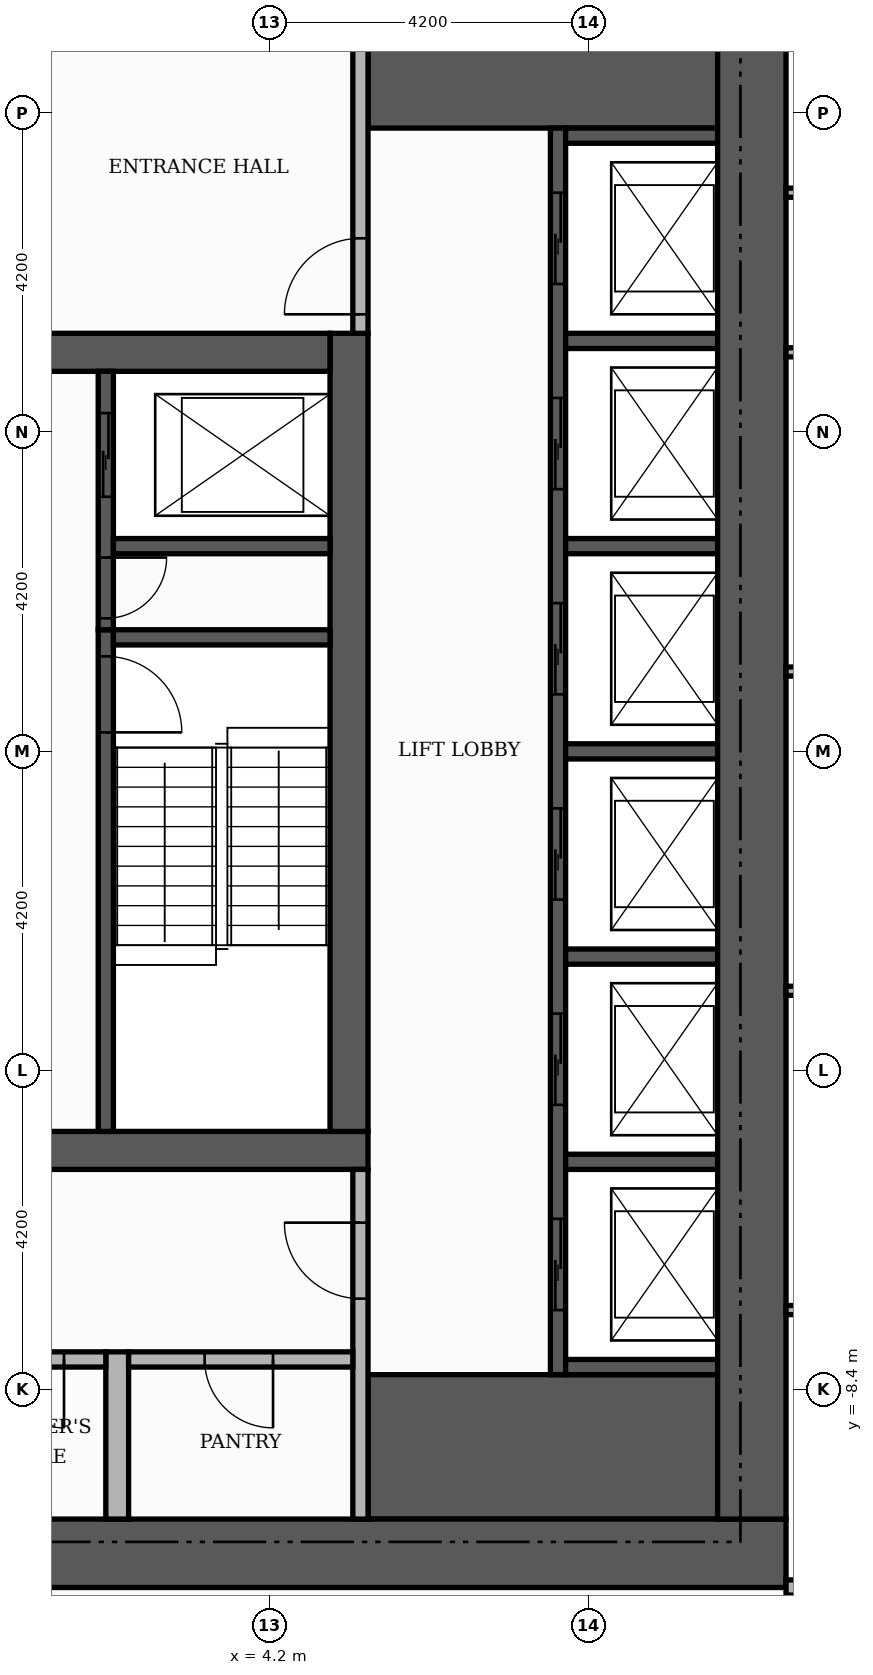
"""IFC4 building model, lengths in metres.
Left out: names, types, materials, properties, quantities, classifications, styles, units other than length and angle.
Written with IfcOpenShell. Run it as: python <this file> out.ifc"""

import sys

from ifc_helpers import new_model, si_unit, direction, frame, frame_2d, origin, place, context, subcontext, project, spatial, rectangle, extrude, element, fill, save


model = new_model("IFC4")
c1 = context("Model", 3, precision=1e-05, world=origin(), true_north=direction((0.0, 1.0)))
c2 = subcontext(c1, "Body", "Model", "MODEL_VIEW")
j1 = project(units=[si_unit("LENGTHUNIT", "METRE"), si_unit("PLANEANGLEUNIT", "RADIAN")], contexts=[c1])
p1 = place(None, origin())
s1 = spatial("IfcSite", under=j1, at=p1, CompositionType="ELEMENT")
p2 = place(p1, origin())
s2 = spatial("IfcBuilding", under=s1, at=p2, CompositionType="ELEMENT")
p3 = place(p2, frame((0.0, 0.0, 244.5)))
s3 = spatial("IfcBuildingStorey", under=s2, at=p3, CompositionType="ELEMENT", Elevation=244.5)
p4 = place(p3, frame((-5.5, -5.25, 0.0), z_axis=(0.0, 0.0, 1.0), x_axis=(1.0, 0.0, 0.0)))
e1 = element("IfcWall", 1, at=p4, inside=s3, PredefinedType="SHEAR", context=c2, shape_type="SweptSolid", body=[
    extrude(rectangle(XDim=11.0, YDim=0.5, at=frame_2d((5.5, 0.0))), origin(), (0.0, 0.0, 1.0), 3.48),
])
p5 = place(p4, frame((4.9, 0.0, 0.0)))
e2 = element("IfcOpeningElement", 2, at=p5, cuts=e1, PredefinedType="OPENING", context=c2, shape_type="SweptSolid", body=[
    extrude(rectangle(XDim=1.2, YDim=2.1, at=frame_2d((0.6, 1.05))), frame((0.0, 0.26, 0.0), z_axis=(0.0, -1.0, 0.0), x_axis=(1.0, 0.0, 0.0)), (0.0, 0.0, 1.0), 0.52),
])
p6 = place(p3, frame((5.25, -5.0, 0.0), z_axis=(0.0, 0.0, 1.0), x_axis=(0.0, 1.0, 0.0)))
e3 = element("IfcWall", 3, at=p6, inside=s3, PredefinedType="SHEAR", context=c2, shape_type="SweptSolid", body=[
    extrude(rectangle(XDim=10.5, YDim=0.5, at=frame_2d((5.25, 0.0))), origin(), (0.0, 0.0, 1.0), 3.48),
])
p7 = place(p3, frame((-5.0, 5.25, 0.0), z_axis=(0.0, 0.0, 1.0), x_axis=(1.0, 0.0, 0.0)))
e4 = element("IfcWall", 4, at=p7, inside=s3, PredefinedType="SHEAR", context=c2, shape_type="SweptSolid", body=[
    extrude(rectangle(XDim=10.0, YDim=0.5, at=frame_2d((5.0, 0.0))), origin(), (0.0, 0.0, 1.0), 3.48),
])
p8 = place(p7, frame((4.4, 0.0, 0.0)))
e5 = element("IfcOpeningElement", 5, at=p8, cuts=e4, PredefinedType="OPENING", context=c2, shape_type="SweptSolid", body=[
    extrude(rectangle(XDim=1.2, YDim=2.1, at=frame_2d((0.6, 1.05))), frame((0.0, 0.26, 0.0), z_axis=(0.0, -1.0, 0.0), x_axis=(1.0, 0.0, 0.0)), (0.0, 0.0, 1.0), 0.52),
])
for number, where, z_axis, x_axis in (
    (6, (5.5, -9.15, 0.0), (0.0, 0.0, 1.0), (1.0, 0.0, 0.0)),
    (7, (5.5, 9.15, 0.0), (0.0, 0.0, 1.0), (1.0, 0.0, 0.0)),
):
    element("IfcWall", number, at=place(p3, frame(where, z_axis=z_axis, x_axis=x_axis)), inside=s3, PredefinedType="SHEAR", context=c2, shape_type="SweptSolid", body=[
        extrude(rectangle(XDim=4.6, YDim=1.9, at=frame_2d((2.3, 0.0))), origin(), (0.0, 0.0, 1.0), 3.48),
    ])
p9 = place(p3, frame((2.05, -5.0, 0.0), z_axis=(0.0, 0.0, 1.0), x_axis=(0.0, 1.0, 0.0)))
e8 = element("IfcWall", 8, at=p9, inside=s3, PredefinedType="SHEAR", context=c2, shape_type="SweptSolid", body=[
    extrude(rectangle(XDim=6.6, YDim=0.2, at=frame_2d((3.3, 0.0))), origin(), (0.0, 0.0, 1.0), 3.48),
])
p10 = place(p9, frame((5.25, 0.0, 0.0)))
e9 = element("IfcOpeningElement", 9, at=p10, cuts=e8, PredefinedType="OPENING", context=c2, shape_type="SweptSolid", body=[
    extrude(rectangle(XDim=1.0, YDim=2.1, at=frame_2d((0.5, 1.05))), frame((0.0, 0.11, 0.0), z_axis=(0.0, -1.0, 0.0), x_axis=(1.0, 0.0, 0.0)), (0.0, 0.0, 1.0), 0.22),
])
p11 = place(p3, frame((2.15, 1.5, 0.0), z_axis=(0.0, 0.0, 1.0), x_axis=(1.0, 0.0, 0.0)))
e10 = element("IfcWall", 10, at=p11, inside=s3, PredefinedType="SHEAR", context=c2, shape_type="SweptSolid", body=[
    extrude(rectangle(XDim=2.85, YDim=0.2, at=frame_2d((1.425, 0.0))), origin(), (0.0, 0.0, 1.0), 3.48),
])
p12 = place(p3, frame((8.0, -8.2, 0.0), z_axis=(0.0, 0.0, 1.0), x_axis=(0.0, 1.0, 0.0)))
e11 = element("IfcWall", 11, at=p12, inside=s3, PredefinedType="SHEAR", context=c2, shape_type="SweptSolid", body=[
    extrude(rectangle(XDim=16.4, YDim=0.2, at=frame_2d((8.2, 0.0))), origin(), (0.0, 0.0, 1.0), 3.48),
])
p13 = place(p12, frame((0.85, 0.0, 0.0)))
e12 = element("IfcOpeningElement", 12, at=p13, cuts=e11, PredefinedType="OPENING", context=c2, shape_type="SweptSolid", body=[
    extrude(rectangle(XDim=1.2, YDim=2.1, at=frame_2d((0.6, 1.05))), frame((0.0, 0.11, 0.0), z_axis=(0.0, -1.0, 0.0), x_axis=(1.0, 0.0, 0.0)), (0.0, 0.0, 1.0), 0.22),
])
p14 = place(p12, frame((3.55, 0.0, 0.0)))
e13 = element("IfcOpeningElement", 13, at=p14, cuts=e11, PredefinedType="OPENING", context=c2, shape_type="SweptSolid", body=[
    extrude(rectangle(XDim=1.2, YDim=2.1, at=frame_2d((0.6, 1.05))), frame((0.0, 0.11, 0.0), z_axis=(0.0, -1.0, 0.0), x_axis=(1.0, 0.0, 0.0)), (0.0, 0.0, 1.0), 0.22),
])
p15 = place(p12, frame((6.25, 0.0, 0.0)))
e14 = element("IfcOpeningElement", 14, at=p15, cuts=e11, PredefinedType="OPENING", context=c2, shape_type="SweptSolid", body=[
    extrude(rectangle(XDim=1.2, YDim=2.1, at=frame_2d((0.6, 1.05))), frame((0.0, 0.11, 0.0), z_axis=(0.0, -1.0, 0.0), x_axis=(1.0, 0.0, 0.0)), (0.0, 0.0, 1.0), 0.22),
])
p16 = place(p12, frame((8.95, 0.0, 0.0)))
e15 = element("IfcOpeningElement", 15, at=p16, cuts=e11, PredefinedType="OPENING", context=c2, shape_type="SweptSolid", body=[
    extrude(rectangle(XDim=1.2, YDim=2.1, at=frame_2d((0.6, 1.05))), frame((0.0, 0.11, 0.0), z_axis=(0.0, -1.0, 0.0), x_axis=(1.0, 0.0, 0.0)), (0.0, 0.0, 1.0), 0.22),
])
p17 = place(p12, frame((11.65, 0.0, 0.0)))
e16 = element("IfcOpeningElement", 16, at=p17, cuts=e11, PredefinedType="OPENING", context=c2, shape_type="SweptSolid", body=[
    extrude(rectangle(XDim=1.2, YDim=2.1, at=frame_2d((0.6, 1.05))), frame((0.0, 0.11, 0.0), z_axis=(0.0, -1.0, 0.0), x_axis=(1.0, 0.0, 0.0)), (0.0, 0.0, 1.0), 0.22),
])
p18 = place(p12, frame((14.35, 0.0, 0.0)))
e17 = element("IfcOpeningElement", 17, at=p18, cuts=e11, PredefinedType="OPENING", context=c2, shape_type="SweptSolid", body=[
    extrude(rectangle(XDim=1.2, YDim=2.1, at=frame_2d((0.6, 1.05))), frame((0.0, 0.11, 0.0), z_axis=(0.0, -1.0, 0.0), x_axis=(1.0, 0.0, 0.0)), (0.0, 0.0, 1.0), 0.22),
])
for number, where, z_axis, x_axis in (
    (18, (8.1, -8.1, 0.0), (0.0, 0.0, 1.0), (1.0, 0.0, 0.0)),
    (19, (8.1, -5.4, 0.0), (0.0, 0.0, 1.0), (1.0, 0.0, 0.0)),
    (20, (8.1, -2.7, 0.0), (0.0, 0.0, 1.0), (1.0, 0.0, 0.0)),
    (21, (8.1, 0.0, 0.0), (0.0, 0.0, 1.0), (1.0, 0.0, 0.0)),
):
    element("IfcWall", number, at=place(p3, frame(where, z_axis=z_axis, x_axis=x_axis)), inside=s3, PredefinedType="SHEAR", context=c2, shape_type="SweptSolid", body=[
        extrude(rectangle(XDim=2.0, YDim=0.2, at=frame_2d((1.0, 0.0))), origin(), (0.0, 0.0, 1.0), 3.48),
    ])
p19 = place(p3, frame((2.05, 1.6, 0.0), z_axis=(0.0, 0.0, 1.0), x_axis=(0.0, 1.0, 0.0)))
e22 = element("IfcWall", 22, at=p19, inside=s3, PredefinedType="SHEAR", context=c2, shape_type="SweptSolid", body=[
    extrude(rectangle(XDim=3.4, YDim=0.2, at=frame_2d((1.7, 0.0))), origin(), (0.0, 0.0, 1.0), 3.48),
])
p20 = place(p19, frame((1.75, 0.0, 0.0)))
e23 = element("IfcOpeningElement", 23, at=p20, cuts=e22, PredefinedType="OPENING", context=c2, shape_type="SweptSolid", body=[
    extrude(rectangle(XDim=1.1, YDim=2.1, at=frame_2d((0.55, 1.05))), frame((0.0, 0.11, 0.0), z_axis=(0.0, -1.0, 0.0), x_axis=(1.0, 0.0, 0.0)), (0.0, 0.0, 1.0), 0.22),
])
p21 = place(p19, frame((0.15, 0.0, 0.0)))
e24 = element("IfcOpeningElement", 24, at=p21, cuts=e22, PredefinedType="OPENING", context=c2, shape_type="SweptSolid", body=[
    extrude(rectangle(XDim=0.8, YDim=2.1, at=frame_2d((0.4, 1.05))), frame((0.0, 0.11, 0.0), z_axis=(0.0, -1.0, 0.0), x_axis=(1.0, 0.0, 0.0)), (0.0, 0.0, 1.0), 0.22),
])
p22 = place(p3, frame((2.15, 2.7, 0.0), z_axis=(0.0, 0.0, 1.0), x_axis=(1.0, 0.0, 0.0)))
e25 = element("IfcWall", 25, at=p22, inside=s3, PredefinedType="SHEAR", context=c2, shape_type="SweptSolid", body=[
    extrude(rectangle(XDim=2.85, YDim=0.2, at=frame_2d((1.425, 0.0))), origin(), (0.0, 0.0, 1.0), 3.48),
])
for number, where, z_axis, x_axis in (
    (26, (8.1, 2.7, 0.0), (0.0, 0.0, 1.0), (1.0, 0.0, 0.0)),
    (27, (8.1, 5.4, 0.0), (0.0, 0.0, 1.0), (1.0, 0.0, 0.0)),
    (28, (8.1, 8.1, 0.0), (0.0, 0.0, 1.0), (1.0, 0.0, 0.0)),
):
    element("IfcWall", number, at=place(p3, frame(where, z_axis=z_axis, x_axis=x_axis)), inside=s3, PredefinedType="SHEAR", context=c2, shape_type="SweptSolid", body=[
        extrude(rectangle(XDim=2.0, YDim=0.2, at=frame_2d((1.0, 0.0))), origin(), (0.0, 0.0, 1.0), 3.48),
    ])
p23 = place(p3, frame((-11.0, -10.55, 0.0), z_axis=(0.0, 0.0, 1.0), x_axis=(1.0, 0.0, 0.0)))
e29 = element("IfcWall", 29, at=p23, inside=s3, PredefinedType="SHEAR", context=c2, shape_type="SweptSolid", body=[
    extrude(rectangle(XDim=22.0, YDim=0.9, at=frame_2d((11.0, 0.0))), origin(), (0.0, 0.0, 1.0), 3.48),
])
p24 = place(p23, frame((7.4, 0.0, 0.0)))
e30 = element("IfcOpeningElement", 30, at=p24, cuts=e29, PredefinedType="OPENING", context=c2, shape_type="SweptSolid", body=[
    extrude(rectangle(XDim=1.8, YDim=2.2, at=frame_2d((0.9, 1.1))), frame((0.0, 0.46, 0.0), z_axis=(0.0, -1.0, 0.0), x_axis=(1.0, 0.0, 0.0)), (0.0, 0.0, 1.0), 0.92),
])
p25 = place(p3, frame((10.55, -10.1, 0.0), z_axis=(0.0, 0.0, 1.0), x_axis=(0.0, 1.0, 0.0)))
e31 = element("IfcWall", 31, at=p25, inside=s3, PredefinedType="SHEAR", context=c2, shape_type="SweptSolid", body=[
    extrude(rectangle(XDim=20.2, YDim=0.9, at=frame_2d((10.1, 0.0))), origin(), (0.0, 0.0, 1.0), 3.48),
])
p26 = place(p3, frame((2.2, -10.1, 0.0), z_axis=(0.0, 0.0, 1.0), x_axis=(0.0, 1.0, 0.0)))
e32 = element("IfcWall", 32, at=p26, inside=s3, PredefinedType="PARTITIONING", context=c2, shape_type="SweptSolid", body=[
    extrude(rectangle(XDim=2.2, YDim=0.3, at=frame_2d((1.1, 0.0))), origin(), (0.0, 0.0, 1.0), 3.48),
])
p27 = place(p3, frame((5.4, -10.1, 0.0), z_axis=(0.0, 0.0, 1.0), x_axis=(0.0, 1.0, 0.0)))
e33 = element("IfcWall", 33, at=p27, inside=s3, PredefinedType="PARTITIONING", context=c2, shape_type="SweptSolid", body=[
    extrude(rectangle(XDim=4.6, YDim=0.2, at=frame_2d((2.3, 0.0))), origin(), (0.0, 0.0, 1.0), 3.48),
])
p28 = place(p27, frame((2.9, 0.0, 0.0)))
e34 = element("IfcOpeningElement", 34, at=p28, cuts=e33, PredefinedType="OPENING", context=c2, shape_type="SweptSolid", body=[
    extrude(rectangle(XDim=1.0, YDim=2.1, at=frame_2d((0.5, 1.05))), frame((0.0, 0.11, 0.0), z_axis=(0.0, -1.0, 0.0), x_axis=(1.0, 0.0, 0.0)), (0.0, 0.0, 1.0), 0.22),
])
p29 = place(p3, frame((0.1, -8.0, 0.0), z_axis=(0.0, 0.0, 1.0), x_axis=(1.0, 0.0, 0.0)))
e35 = element("IfcWall", 35, at=p29, inside=s3, PredefinedType="PARTITIONING", context=c2, shape_type="SweptSolid", body=[
    extrude(rectangle(XDim=1.95, YDim=0.2, at=frame_2d((0.975, 0.0))), origin(), (0.0, 0.0, 1.0), 3.48),
])
p30 = place(p29, frame((0.5, 0.0, 0.0)))
e36 = element("IfcOpeningElement", 36, at=p30, cuts=e35, PredefinedType="OPENING", context=c2, shape_type="SweptSolid", body=[
    extrude(rectangle(XDim=0.9, YDim=2.1, at=frame_2d((0.45, 1.05))), frame((0.0, 0.11, 0.0), z_axis=(0.0, -1.0, 0.0), x_axis=(1.0, 0.0, 0.0)), (0.0, 0.0, 1.0), 0.22),
])
p31 = place(p3, frame((2.35, -8.0, 0.0), z_axis=(0.0, 0.0, 1.0), x_axis=(1.0, 0.0, 0.0)))
e37 = element("IfcWall", 37, at=p31, inside=s3, PredefinedType="PARTITIONING", context=c2, shape_type="SweptSolid", body=[
    extrude(rectangle(XDim=2.95, YDim=0.2, at=frame_2d((1.475, 0.0))), origin(), (0.0, 0.0, 1.0), 3.48),
])
p32 = place(p31, frame((1.0, 0.0, 0.0)))
e38 = element("IfcOpeningElement", 38, at=p32, cuts=e37, PredefinedType="OPENING", context=c2, shape_type="SweptSolid", body=[
    extrude(rectangle(XDim=0.9, YDim=2.1, at=frame_2d((0.45, 1.05))), frame((0.0, 0.11, 0.0), z_axis=(0.0, -1.0, 0.0), x_axis=(1.0, 0.0, 0.0)), (0.0, 0.0, 1.0), 0.22),
])
p33 = place(p3, frame((5.4, 5.5, 0.0), z_axis=(0.0, 0.0, 1.0), x_axis=(0.0, 1.0, 0.0)))
e39 = element("IfcWall", 39, at=p33, inside=s3, PredefinedType="PARTITIONING", context=c2, shape_type="SweptSolid", body=[
    extrude(rectangle(XDim=4.6, YDim=0.2, at=frame_2d((2.3, 0.0))), origin(), (0.0, 0.0, 1.0), 3.48),
])
p34 = place(p33, frame((0.25, 0.0, 0.0)))
e40 = element("IfcOpeningElement", 40, at=p34, cuts=e39, PredefinedType="OPENING", context=c2, shape_type="SweptSolid", body=[
    extrude(rectangle(XDim=1.0, YDim=2.1, at=frame_2d((0.5, 1.05))), frame((0.0, 0.11, 0.0), z_axis=(0.0, -1.0, 0.0), x_axis=(1.0, 0.0, 0.0)), (0.0, 0.0, 1.0), 0.22),
])
p35 = place(p3, frame((11.0, -11.0, 0.0), z_axis=(0.0, 0.0, 1.0), x_axis=(1.0, 0.0, 0.0)))
e41 = element("IfcWall", 41, at=p35, inside=s3, PredefinedType="PARTITIONING", context=c2, shape_type="SweptSolid", body=[
    extrude(rectangle(XDim=2.65, YDim=0.2, at=frame_2d((1.325, 0.0))), origin(), (0.0, 0.0, 1.0), 3.48),
])
p36 = place(p35, frame((0.775, 0.0, 0.0)))
e42 = element("IfcOpeningElement", 42, at=p36, cuts=e41, PredefinedType="OPENING", context=c2, shape_type="SweptSolid", body=[
    extrude(rectangle(XDim=1.1, YDim=2.4, at=frame_2d((0.55, 1.2))), frame((0.0, 0.11, 0.0), z_axis=(0.0, -1.0, 0.0), x_axis=(1.0, 0.0, 0.0)), (0.0, 0.0, 1.0), 0.22),
])
p37 = place(p3, frame((11.0, -7.35, 0.0), z_axis=(0.0, 0.0, 1.0), x_axis=(1.0, 0.0, 0.0)))
e43 = element("IfcWall", 43, at=p37, inside=s3, PredefinedType="PARTITIONING", context=c2, shape_type="SweptSolid", body=[
    extrude(rectangle(XDim=8.22, YDim=0.12, at=frame_2d((4.11, 0.0))), origin(), (0.0, 0.0, 1.0), 3.48),
])
p38 = place(p37, frame((3.66, 0.0, 0.0)))
e44 = element("IfcOpeningElement", 44, at=p38, cuts=e43, PredefinedType="OPENING", context=c2, shape_type="SweptSolid", body=[
    extrude(rectangle(XDim=0.9, YDim=2.1, at=frame_2d((0.45, 1.05))), frame((0.0, 0.07, 0.0), z_axis=(0.0, -1.0, 0.0), x_axis=(1.0, 0.0, 0.0)), (0.0, 0.0, 1.0), 0.14),
])
for number, where, z_axis, x_axis in (
    (45, (11.0, -3.15, 0.0), (0.0, 0.0, 1.0), (1.0, 0.0, 0.0)),
    (46, (11.0, 1.05, 0.0), (0.0, 0.0, 1.0), (1.0, 0.0, 0.0)),
    (47, (11.0, 5.25, 0.0), (0.0, 0.0, 1.0), (1.0, 0.0, 0.0)),
    (48, (11.0, 7.35, 0.0), (0.0, 0.0, 1.0), (1.0, 0.0, 0.0)),
):
    element("IfcWall", number, at=place(p3, frame(where, z_axis=z_axis, x_axis=x_axis)), inside=s3, PredefinedType="PARTITIONING", context=c2, shape_type="SweptSolid", body=[
        extrude(rectangle(XDim=8.22, YDim=0.12, at=frame_2d((4.11, 0.0))), origin(), (0.0, 0.0, 1.0), 3.48),
    ])
p39 = place(p13, origin())
e49 = element("IfcDoor", 49, at=p39, inside=s3, OperationType="SLIDING_TO_LEFT", PredefinedType="DOOR", context=c2, shape_type="SweptSolid", body=[
    extrude(rectangle(XDim=1.2, YDim=2.1, at=frame_2d((0.6, 1.05))), frame((0.0, 0.025, 0.0), z_axis=(0.0, -1.0, 0.0), x_axis=(1.0, 0.0, 0.0)), (0.0, 0.0, 1.0), 0.05),
])
fill(e12, e49)
p40 = place(p14, origin())
e50 = element("IfcDoor", 50, at=p40, inside=s3, OperationType="SLIDING_TO_LEFT", PredefinedType="DOOR", context=c2, shape_type="SweptSolid", body=[
    extrude(rectangle(XDim=1.2, YDim=2.1, at=frame_2d((0.6, 1.05))), frame((0.0, 0.025, 0.0), z_axis=(0.0, -1.0, 0.0), x_axis=(1.0, 0.0, 0.0)), (0.0, 0.0, 1.0), 0.05),
])
fill(e13, e50)
p41 = place(p15, origin())
e51 = element("IfcDoor", 51, at=p41, inside=s3, OperationType="SLIDING_TO_LEFT", PredefinedType="DOOR", context=c2, shape_type="SweptSolid", body=[
    extrude(rectangle(XDim=1.2, YDim=2.1, at=frame_2d((0.6, 1.05))), frame((0.0, 0.025, 0.0), z_axis=(0.0, -1.0, 0.0), x_axis=(1.0, 0.0, 0.0)), (0.0, 0.0, 1.0), 0.05),
])
fill(e14, e51)
p42 = place(p16, origin())
e52 = element("IfcDoor", 52, at=p42, inside=s3, OperationType="SLIDING_TO_LEFT", PredefinedType="DOOR", context=c2, shape_type="SweptSolid", body=[
    extrude(rectangle(XDim=1.2, YDim=2.1, at=frame_2d((0.6, 1.05))), frame((0.0, 0.025, 0.0), z_axis=(0.0, -1.0, 0.0), x_axis=(1.0, 0.0, 0.0)), (0.0, 0.0, 1.0), 0.05),
])
fill(e15, e52)
p43 = place(p17, origin())
e53 = element("IfcDoor", 53, at=p43, inside=s3, OperationType="SLIDING_TO_LEFT", PredefinedType="DOOR", context=c2, shape_type="SweptSolid", body=[
    extrude(rectangle(XDim=1.2, YDim=2.1, at=frame_2d((0.6, 1.05))), frame((0.0, 0.025, 0.0), z_axis=(0.0, -1.0, 0.0), x_axis=(1.0, 0.0, 0.0)), (0.0, 0.0, 1.0), 0.05),
])
fill(e16, e53)
p44 = place(p18, origin())
e54 = element("IfcDoor", 54, at=p44, inside=s3, OperationType="SLIDING_TO_LEFT", PredefinedType="DOOR", context=c2, shape_type="SweptSolid", body=[
    extrude(rectangle(XDim=1.2, YDim=2.1, at=frame_2d((0.6, 1.05))), frame((0.0, 0.025, 0.0), z_axis=(0.0, -1.0, 0.0), x_axis=(1.0, 0.0, 0.0)), (0.0, 0.0, 1.0), 0.05),
])
fill(e17, e54)
p45 = place(p20, origin())
e55 = element("IfcDoor", 55, at=p45, inside=s3, OperationType="SLIDING_TO_LEFT", PredefinedType="DOOR", context=c2, shape_type="SweptSolid", body=[
    extrude(rectangle(XDim=1.1, YDim=2.1, at=frame_2d((0.55, 1.05))), frame((0.0, 0.025, 0.0), z_axis=(0.0, -1.0, 0.0), x_axis=(1.0, 0.0, 0.0)), (0.0, 0.0, 1.0), 0.05),
])
fill(e23, e55)
p46 = place(p10, frame((1.0, 0.0, 0.0), z_axis=(0.0, 0.0, 1.0), x_axis=(-1.0, 0.0, 0.0)))
e56 = element("IfcDoor", 56, at=p46, inside=s3, OperationType="SINGLE_SWING_LEFT", PredefinedType="DOOR", context=c2, shape_type="SweptSolid", body=[
    extrude(rectangle(XDim=1.0, YDim=2.1, at=frame_2d((0.5, 1.05))), frame((0.0, 0.025, 0.0), z_axis=(0.0, -1.0, 0.0), x_axis=(1.0, 0.0, 0.0)), (0.0, 0.0, 1.0), 0.05),
])
fill(e9, e56)
p47 = place(p21, frame((0.8, 0.0, 0.0), z_axis=(0.0, 0.0, 1.0), x_axis=(-1.0, 0.0, 0.0)))
e57 = element("IfcDoor", 57, at=p47, inside=s3, OperationType="SINGLE_SWING_RIGHT", PredefinedType="DOOR", context=c2, shape_type="SweptSolid", body=[
    extrude(rectangle(XDim=0.8, YDim=2.1, at=frame_2d((0.4, 1.05))), frame((0.0, 0.025, 0.0), z_axis=(0.0, -1.0, 0.0), x_axis=(1.0, 0.0, 0.0)), (0.0, 0.0, 1.0), 0.05),
])
fill(e24, e57)
p48 = place(p34, origin())
e58 = element("IfcDoor", 58, at=p48, inside=s3, OperationType="SINGLE_SWING_LEFT", PredefinedType="DOOR", context=c2, shape_type="SweptSolid", body=[
    extrude(rectangle(XDim=1.0, YDim=2.1, at=frame_2d((0.5, 1.05))), frame((0.0, 0.025, 0.0), z_axis=(0.0, -1.0, 0.0), x_axis=(1.0, 0.0, 0.0)), (0.0, 0.0, 1.0), 0.05),
])
fill(e40, e58)
p49 = place(p28, origin())
e59 = element("IfcDoor", 59, at=p49, inside=s3, OperationType="SINGLE_SWING_RIGHT", PredefinedType="DOOR", context=c2, shape_type="SweptSolid", body=[
    extrude(rectangle(XDim=1.0, YDim=2.1, at=frame_2d((0.5, 1.05))), frame((0.0, 0.025, 0.0), z_axis=(0.0, -1.0, 0.0), x_axis=(1.0, 0.0, 0.0)), (0.0, 0.0, 1.0), 0.05),
])
fill(e34, e59)
p50 = place(p30, frame((0.9, 0.0, 0.0), z_axis=(0.0, 0.0, 1.0), x_axis=(-1.0, 0.0, 0.0)))
e60 = element("IfcDoor", 60, at=p50, inside=s3, OperationType="SINGLE_SWING_RIGHT", PredefinedType="DOOR", context=c2, shape_type="SweptSolid", body=[
    extrude(rectangle(XDim=0.9, YDim=2.1, at=frame_2d((0.45, 1.05))), frame((0.0, 0.025, 0.0), z_axis=(0.0, -1.0, 0.0), x_axis=(1.0, 0.0, 0.0)), (0.0, 0.0, 1.0), 0.05),
])
fill(e36, e60)
p51 = place(p32, frame((0.9, 0.0, 0.0), z_axis=(0.0, 0.0, 1.0), x_axis=(-1.0, 0.0, 0.0)))
e61 = element("IfcDoor", 61, at=p51, inside=s3, OperationType="SINGLE_SWING_RIGHT", PredefinedType="DOOR", context=c2, shape_type="SweptSolid", body=[
    extrude(rectangle(XDim=0.9, YDim=2.1, at=frame_2d((0.45, 1.05))), frame((0.0, 0.025, 0.0), z_axis=(0.0, -1.0, 0.0), x_axis=(1.0, 0.0, 0.0)), (0.0, 0.0, 1.0), 0.05),
])
fill(e38, e61)
save(model, sys.argv[1])
